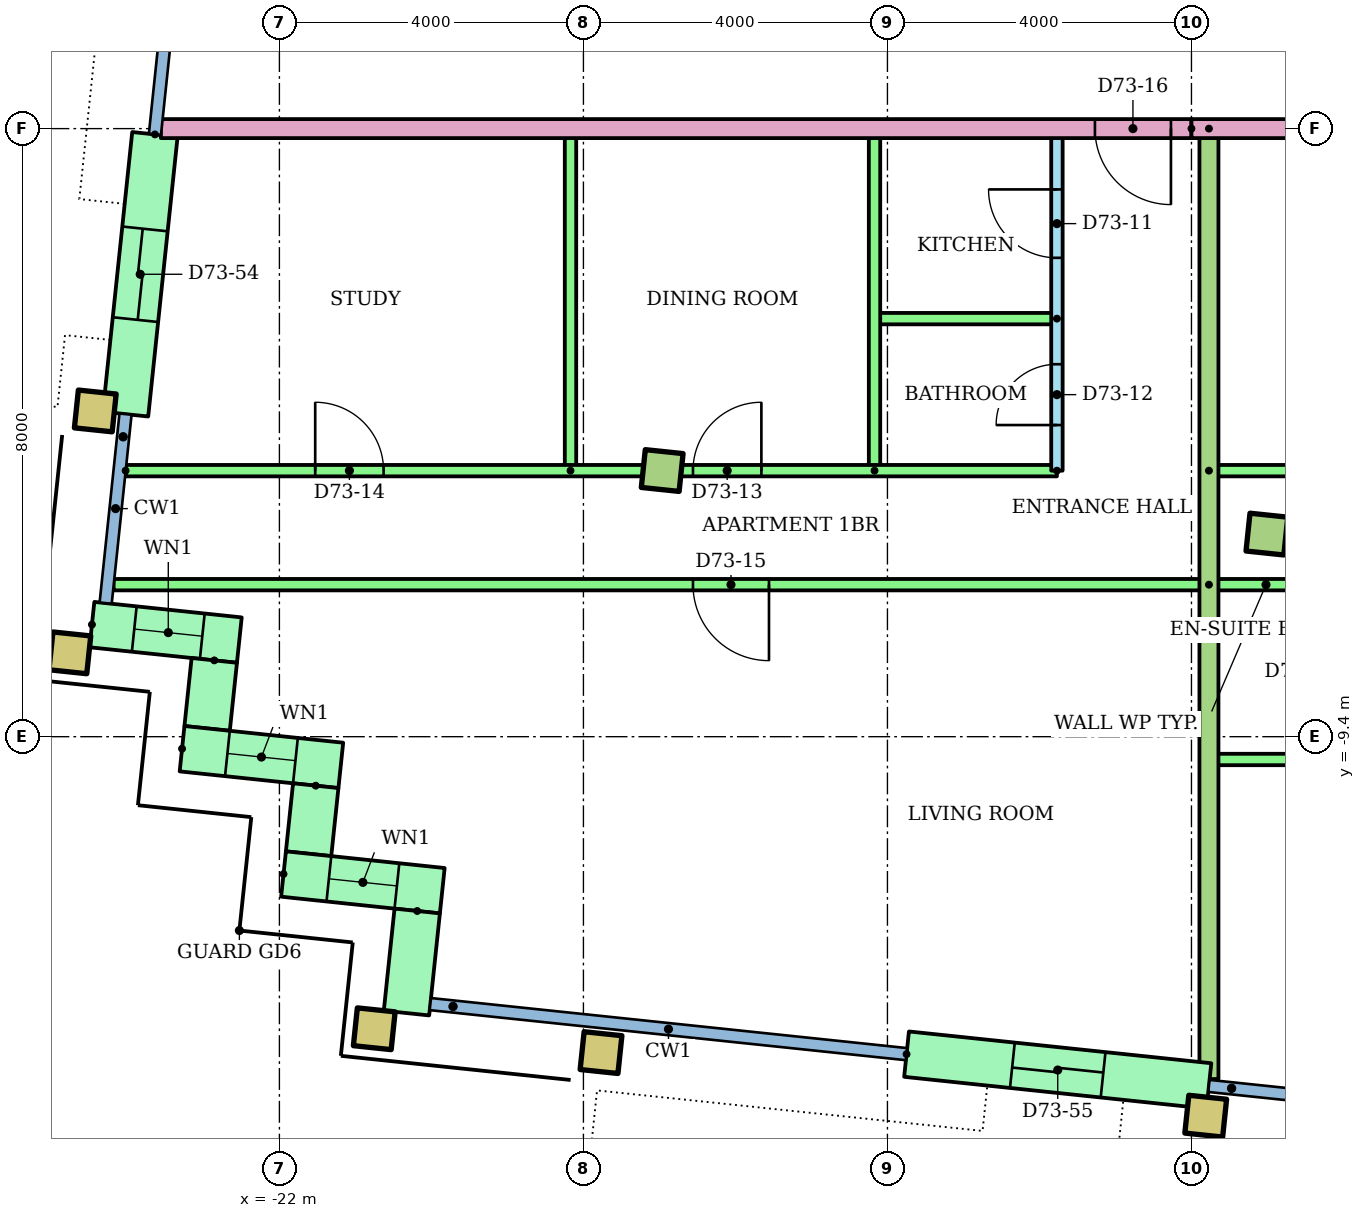
"""IFC4 building model, lengths in metres.
Left out: names, types, materials, properties, quantities, classifications, styles, units other than length and angle.
Written with IfcOpenShell. Run it as: python <this file> out.ifc"""

import sys

from ifc_helpers import new_model, si_unit, direction, frame, frame_2d, origin, origin_2d, place, context, subcontext, project, spatial, rectangle, hollow_rectangle, extrude, element, fill, save


model = new_model("IFC4")
c1 = context("Model", 3, precision=1e-05, world=origin(), true_north=direction((0.0, 1.0)))
c2 = subcontext(c1, "Body", "Model", "MODEL_VIEW")
j1 = project(units=[si_unit("LENGTHUNIT", "METRE"), si_unit("PLANEANGLEUNIT", "RADIAN")], contexts=[c1])
p1 = place(None, origin())
s1 = spatial("IfcSite", under=j1, at=p1, CompositionType="ELEMENT")
p2 = place(p1, origin())
s2 = spatial("IfcBuilding", under=s1, at=p2, CompositionType="ELEMENT")
p3 = place(p2, frame((0.0, 0.0, 278.7)))
s3 = spatial("IfcBuildingStorey", under=s2, at=p3, CompositionType="ELEMENT", Elevation=278.7)
for number, where, z_axis, x_axis in (
    (1, (-20.752, -13.243, 0.0), (0.0, 0.0, 1.0), (0.995, -0.105, 0.0)),
    (2, (-17.768, -13.556, 0.0), (0.0, 0.0, 1.0), (0.995, -0.105, 0.0)),
    (3, (-9.812, -14.392, 0.0), (0.0, 0.0, 1.0), (0.995, -0.105, 0.0)),
    (4, (-24.757, -8.297, 0.0), (0.0, 0.0, 1.0), (0.995, -0.105, 0.0)),
    (5, (-24.423, -5.115, 0.0), (0.0, 0.0, 1.0), (0.995, -0.105, 0.0)),
):
    element("IfcColumn", number, at=place(p3, frame(where, z_axis=z_axis, x_axis=x_axis)), inside=s3, PredefinedType="COLUMN", context=c2, shape_type="SweptSolid", body=[
        extrude(hollow_rectangle(XDim=0.5, YDim=0.5, WallThickness=0.025, at=origin_2d()), origin(), (0.0, 0.0, 1.0), 3.2),
    ])
for number, where, z_axis, x_axis in (
    (6, (-16.964, -5.898, 0.0), (0.0, 0.0, 1.0), (0.995, -0.105, 0.0)),
    (7, (-9.007, -6.735, 0.0), (0.0, 0.0, 1.0), (0.995, -0.105, 0.0)),
):
    element("IfcColumn", number, at=place(p3, frame(where, z_axis=z_axis, x_axis=x_axis)), inside=s3, PredefinedType="COLUMN", context=c2, shape_type="SweptSolid", body=[
        extrude(rectangle(XDim=0.5, YDim=0.5, at=origin_2d()), origin(), (0.0, 0.0, 1.0), 3.2),
    ])
p4 = place(p3, frame((-23.638, -1.476, 0.0), z_axis=(0.0, 0.0, 1.0), x_axis=(-0.104513052986, -0.994523514933, 0.0)))
e8 = element("IfcWall", 8, at=p4, inside=s3, PredefinedType="STANDARD", context=c2, shape_type="SweptSolid", body=[
    extrude(rectangle(XDim=3.7, YDim=0.6, at=frame_2d((1.85, 0.0))), origin(), (0.0, 0.0, 1.0), 2.8),
])
p5 = place(p4, frame((1.25, 0.0, 0.0)))
e9 = element("IfcOpeningElement", 9, at=p5, cuts=e8, PredefinedType="OPENING", context=c2, shape_type="SweptSolid", body=[
    extrude(rectangle(XDim=1.2, YDim=2.1, at=frame_2d((0.6, 1.05))), frame((0.0, 0.31, 0.0), z_axis=(0.0, -1.0, 0.0), x_axis=(1.0, 0.0, 0.0)), (0.0, 0.0, 1.0), 0.62),
])
p6 = place(p3, frame((-24.467, -7.925, 0.0), z_axis=(0.0, 0.0, 1.0), x_axis=(0.994521219184, -0.104534896528, 0.0)))
e10 = element("IfcWall", 10, at=p6, inside=s3, PredefinedType="STANDARD", context=c2, shape_type="SweptSolid", body=[
    extrude(rectangle(XDim=1.95, YDim=0.6, at=frame_2d((0.975, 0.0))), origin(), (0.0, 0.0, 1.0), 2.8),
])
p7 = place(p6, frame((0.56, 0.0, 0.9)))
e11 = element("IfcOpeningElement", 11, at=p7, cuts=e10, PredefinedType="OPENING", context=c2, shape_type="SweptSolid", body=[
    extrude(rectangle(XDim=0.9, YDim=1.5, at=frame_2d((0.45, 0.75))), frame((0.0, 0.31, 0.0), z_axis=(0.0, -1.0, 0.0), x_axis=(1.0, 0.0, 0.0)), (0.0, 0.0, 1.0), 0.62),
])
p8 = place(p3, frame((-22.857, -8.396, 0.0), z_axis=(0.0, 0.0, 1.0), x_axis=(-0.104444712852, -0.994530694326, 0.0)))
e12 = element("IfcWall", 12, at=p8, inside=s3, PredefinedType="STANDARD", context=c2, shape_type="SweptSolid", body=[
    extrude(rectangle(XDim=0.9, YDim=0.6, at=frame_2d((0.45, 0.0))), origin(), (0.0, 0.0, 1.0), 2.8),
])
p9 = place(p3, frame((-23.281, -9.558, 0.0), z_axis=(0.0, 0.0, 1.0), x_axis=(0.994523910136, -0.104509292252, 0.0)))
e13 = element("IfcWall", 13, at=p9, inside=s3, PredefinedType="STANDARD", context=c2, shape_type="SweptSolid", body=[
    extrude(rectangle(XDim=2.1, YDim=0.6, at=frame_2d((1.05, 0.0))), origin(), (0.0, 0.0, 1.0), 2.8),
])
p10 = place(p9, frame((0.6, 0.0, 0.9)))
e14 = element("IfcOpeningElement", 14, at=p10, cuts=e13, PredefinedType="OPENING", context=c2, shape_type="SweptSolid", body=[
    extrude(rectangle(XDim=0.9, YDim=1.5, at=frame_2d((0.45, 0.75))), frame((0.0, 0.31, 0.0), z_axis=(0.0, -1.0, 0.0), x_axis=(1.0, 0.0, 0.0)), (0.0, 0.0, 1.0), 0.62),
])
p11 = place(p3, frame((-21.522, -10.044, 0.0), z_axis=(0.0, 0.0, 1.0), x_axis=(-0.104416541099, -0.994533652495, 0.0)))
e15 = element("IfcWall", 15, at=p11, inside=s3, PredefinedType="STANDARD", context=c2, shape_type="SweptSolid", body=[
    extrude(rectangle(XDim=0.9, YDim=0.6, at=frame_2d((0.45, 0.0))), origin(), (0.0, 0.0, 1.0), 2.8),
])
p12 = place(p3, frame((-21.946, -11.207, 0.0), z_axis=(0.0, 0.0, 1.0), x_axis=(0.994511820899, -0.104624271047, 0.0)))
e16 = element("IfcWall", 16, at=p12, inside=s3, PredefinedType="STANDARD", context=c2, shape_type="SweptSolid", body=[
    extrude(rectangle(XDim=2.1, YDim=0.6, at=frame_2d((1.05, 0.0))), origin(), (0.0, 0.0, 1.0), 2.8),
])
p13 = place(p12, frame((0.6, 0.0, 0.9)))
e17 = element("IfcOpeningElement", 17, at=p13, cuts=e16, PredefinedType="OPENING", context=c2, shape_type="SweptSolid", body=[
    extrude(rectangle(XDim=0.9, YDim=1.5, at=frame_2d((0.45, 0.75))), frame((0.0, 0.31, 0.0), z_axis=(0.0, -1.0, 0.0), x_axis=(1.0, 0.0, 0.0)), (0.0, 0.0, 1.0), 0.62),
])
p14 = place(p3, frame((-20.187, -11.693, 0.0), z_axis=(0.0, 0.0, 1.0), x_axis=(-0.1043365026, -0.994542052517, 0.0)))
e18 = element("IfcWall", 18, at=p14, inside=s3, PredefinedType="STANDARD", context=c2, shape_type="SweptSolid", body=[
    extrude(rectangle(XDim=1.35, YDim=0.6, at=frame_2d((0.675, 0.0))), origin(), (0.0, 0.0, 1.0), 2.8),
])
p15 = place(p3, frame((-13.749, -13.576, 0.0), z_axis=(0.0, 0.0, 1.0), x_axis=(0.994519156568, -0.104554517933, 0.0)))
e19 = element("IfcWall", 19, at=p15, inside=s3, PredefinedType="STANDARD", context=c2, shape_type="SweptSolid", body=[
    extrude(rectangle(XDim=4.0, YDim=0.6, at=frame_2d((2.0, 0.0))), origin(), (0.0, 0.0, 1.0), 2.8),
])
p16 = place(p15, frame((1.4, 0.0, 0.0)))
e20 = element("IfcOpeningElement", 20, at=p16, cuts=e19, PredefinedType="OPENING", context=c2, shape_type="SweptSolid", body=[
    extrude(rectangle(XDim=1.2, YDim=2.1, at=frame_2d((0.6, 1.05))), frame((0.0, 0.31, 0.0), z_axis=(0.0, -1.0, 0.0), x_axis=(1.0, 0.0, 0.0)), (0.0, 0.0, 1.0), 0.62),
])
p17 = place(p3, frame((-11.77, -5.9, 0.0), z_axis=(0.0, 0.0, 1.0), x_axis=(0.0, 1.0, 0.0)))
e21 = element("IfcWall", 21, at=p17, inside=s3, PredefinedType="PARTITIONING", context=c2, shape_type="SweptSolid", body=[
    extrude(rectangle(XDim=4.5, YDim=0.15, at=frame_2d((2.25, 0.0))), origin(), (0.0, 0.0, 1.0), 2.4),
])
p18 = place(p17, frame((2.8, 0.0, 0.0)))
e22 = element("IfcOpeningElement", 22, at=p18, cuts=e21, PredefinedType="OPENING", context=c2, shape_type="SweptSolid", body=[
    extrude(rectangle(XDim=0.9, YDim=2.1, at=frame_2d((0.45, 1.05))), frame((0.0, 0.085, 0.0), z_axis=(0.0, -1.0, 0.0), x_axis=(1.0, 0.0, 0.0)), (0.0, 0.0, 1.0), 0.17),
])
p19 = place(p17, frame((0.6, 0.0, 0.0)))
e23 = element("IfcOpeningElement", 23, at=p19, cuts=e21, PredefinedType="OPENING", context=c2, shape_type="SweptSolid", body=[
    extrude(rectangle(XDim=0.8, YDim=2.1, at=frame_2d((0.4, 1.05))), frame((0.0, 0.085, 0.0), z_axis=(0.0, -1.0, 0.0), x_axis=(1.0, 0.0, 0.0)), (0.0, 0.0, 1.0), 0.17),
])
p20 = place(p3, frame((-11.77, -3.9, 0.0), z_axis=(0.0, 0.0, 1.0), x_axis=(-1.0, 0.0, 0.0)))
e24 = element("IfcWall", 24, at=p20, inside=s3, PredefinedType="PARTITIONING", context=c2, shape_type="SweptSolid", body=[
    extrude(rectangle(XDim=2.4, YDim=0.15, at=frame_2d((1.2, 0.0))), origin(), (0.0, 0.0, 1.0), 2.4),
])
for number, where, z_axis, x_axis in (
    (25, (-14.17, -5.9, 0.0), (0.0, 0.0, 1.0), (0.0, 1.0, 0.0)),
    (26, (-18.17, -5.9, 0.0), (0.0, 0.0, 1.0), (0.0, 1.0, 0.0)),
):
    element("IfcWall", number, at=place(p3, frame(where, z_axis=z_axis, x_axis=x_axis)), inside=s3, PredefinedType="PARTITIONING", context=c2, shape_type="SweptSolid", body=[
        extrude(rectangle(XDim=4.5, YDim=0.15, at=frame_2d((2.25, 0.0))), origin(), (0.0, 0.0, 1.0), 2.4),
    ])
p21 = place(p3, frame((-24.023, -5.9, 0.0)))
e27 = element("IfcWall", 27, at=p21, inside=s3, PredefinedType="PARTITIONING", context=c2, shape_type="SweptSolid", body=[
    extrude(rectangle(XDim=12.253, YDim=0.15, at=frame_2d((6.127, 0.0))), origin(), (0.0, 0.0, 1.0), 2.4),
])
p22 = place(p21, frame((7.465, 0.0, 0.0)))
e28 = element("IfcOpeningElement", 28, at=p22, cuts=e27, PredefinedType="OPENING", context=c2, shape_type="SweptSolid", body=[
    extrude(rectangle(XDim=0.9, YDim=2.1, at=frame_2d((0.45, 1.05))), frame((0.0, 0.085, 0.0), z_axis=(0.0, -1.0, 0.0), x_axis=(1.0, 0.0, 0.0)), (0.0, 0.0, 1.0), 0.17),
])
p23 = place(p21, frame((2.494, 0.0, 0.0)))
e29 = element("IfcOpeningElement", 29, at=p23, cuts=e27, PredefinedType="OPENING", context=c2, shape_type="SweptSolid", body=[
    extrude(rectangle(XDim=0.9, YDim=2.1, at=frame_2d((0.45, 1.05))), frame((0.0, 0.085, 0.0), z_axis=(0.0, -1.0, 0.0), x_axis=(1.0, 0.0, 0.0)), (0.0, 0.0, 1.0), 0.17),
])
p24 = place(p3, frame((-9.77, -7.4, 0.0), z_axis=(0.0, 0.0, 1.0), x_axis=(-1.0, 0.0, 0.0)))
e30 = element("IfcWall", 30, at=p24, inside=s3, PredefinedType="PARTITIONING", context=c2, shape_type="SweptSolid", body=[
    extrude(rectangle(XDim=14.411, YDim=0.15, at=frame_2d((7.206, 0.0))), origin(), (0.0, 0.0, 1.0), 2.4),
])
p25 = place(p24, frame((5.789, 0.0, 0.0)))
e31 = element("IfcOpeningElement", 31, at=p25, cuts=e30, PredefinedType="OPENING", context=c2, shape_type="SweptSolid", body=[
    extrude(rectangle(XDim=1.0, YDim=2.1, at=frame_2d((0.5, 1.05))), frame((0.0, 0.085, 0.0), z_axis=(0.0, -1.0, 0.0), x_axis=(1.0, 0.0, 0.0)), (0.0, 0.0, 1.0), 0.17),
])
p26 = place(p3, frame((-9.77, -5.9, 0.0)))
e32 = element("IfcWall", 32, at=p26, inside=s3, PredefinedType="PARTITIONING", context=c2, shape_type="SweptSolid", body=[
    extrude(rectangle(XDim=13.912, YDim=0.15, at=frame_2d((6.956, 0.0))), origin(), (0.0, 0.0, 1.0), 2.4),
])
p27 = place(p26, frame((9.562, 0.0, 0.0)))
e33 = element("IfcOpeningElement", 33, at=p27, cuts=e32, PredefinedType="OPENING", context=c2, shape_type="SweptSolid", body=[
    extrude(rectangle(XDim=0.9, YDim=2.1, at=frame_2d((0.45, 1.05))), frame((0.0, 0.085, 0.0), z_axis=(0.0, -1.0, 0.0), x_axis=(1.0, 0.0, 0.0)), (0.0, 0.0, 1.0), 0.17),
])
p28 = place(p26, frame((6.187, 0.0, 0.0)))
e34 = element("IfcOpeningElement", 34, at=p28, cuts=e32, PredefinedType="OPENING", context=c2, shape_type="SweptSolid", body=[
    extrude(rectangle(XDim=0.9, YDim=2.1, at=frame_2d((0.45, 1.05))), frame((0.0, 0.085, 0.0), z_axis=(0.0, -1.0, 0.0), x_axis=(1.0, 0.0, 0.0)), (0.0, 0.0, 1.0), 0.17),
])
p29 = place(p26, frame((1.931, 0.0, 0.0)))
e35 = element("IfcOpeningElement", 35, at=p29, cuts=e32, PredefinedType="OPENING", context=c2, shape_type="SweptSolid", body=[
    extrude(rectangle(XDim=0.9, YDim=2.1, at=frame_2d((0.45, 1.05))), frame((0.0, 0.085, 0.0), z_axis=(0.0, -1.0, 0.0), x_axis=(1.0, 0.0, 0.0)), (0.0, 0.0, 1.0), 0.17),
])
p30 = place(p3, frame((6.142, -7.4, 0.0), z_axis=(0.0, 0.0, 1.0), x_axis=(-1.0, 0.0, 0.0)))
e36 = element("IfcWall", 36, at=p30, inside=s3, PredefinedType="PARTITIONING", context=c2, shape_type="SweptSolid", body=[
    extrude(rectangle(XDim=15.912, YDim=0.15, at=frame_2d((7.956, 0.0))), origin(), (0.0, 0.0, 1.0), 2.4),
])
p31 = place(p30, frame((12.252, 0.0, 0.0)))
e37 = element("IfcOpeningElement", 37, at=p31, cuts=e36, PredefinedType="OPENING", context=c2, shape_type="SweptSolid", body=[
    extrude(rectangle(XDim=0.9, YDim=2.1, at=frame_2d((0.45, 1.05))), frame((0.0, 0.085, 0.0), z_axis=(0.0, -1.0, 0.0), x_axis=(1.0, 0.0, 0.0)), (0.0, 0.0, 1.0), 0.17),
])
p32 = place(p30, frame((9.495, 0.0, 0.0)))
e38 = element("IfcOpeningElement", 38, at=p32, cuts=e36, PredefinedType="OPENING", context=c2, shape_type="SweptSolid", body=[
    extrude(rectangle(XDim=0.9, YDim=2.1, at=frame_2d((0.45, 1.05))), frame((0.0, 0.085, 0.0), z_axis=(0.0, -1.0, 0.0), x_axis=(1.0, 0.0, 0.0)), (0.0, 0.0, 1.0), 0.17),
])
p33 = place(p30, frame((3.478, 0.0, 0.0)))
e39 = element("IfcOpeningElement", 39, at=p33, cuts=e36, PredefinedType="OPENING", context=c2, shape_type="SweptSolid", body=[
    extrude(rectangle(XDim=1.0, YDim=2.1, at=frame_2d((0.5, 1.05))), frame((0.0, 0.085, 0.0), z_axis=(0.0, -1.0, 0.0), x_axis=(1.0, 0.0, 0.0)), (0.0, 0.0, 1.0), 0.17),
])
p34 = place(p3, frame((-7.77, -9.7, 0.0), z_axis=(0.0, 0.0, 1.0), x_axis=(-1.0, 0.0, 0.0)))
e40 = element("IfcWall", 40, at=p34, inside=s3, PredefinedType="PARTITIONING", context=c2, shape_type="SweptSolid", body=[
    extrude(rectangle(XDim=2.0, YDim=0.15, at=frame_2d((1.0, 0.0))), origin(), (0.0, 0.0, 1.0), 2.4),
])
p35 = place(p3, frame((-9.77, -1.4, 0.0), z_axis=(0.0, 0.0, 1.0), x_axis=(0.0, -1.0, 0.0)))
e41 = element("IfcWall", 41, at=p35, inside=s3, PredefinedType="PARTITIONING", context=c2, shape_type="SweptSolid", body=[
    extrude(rectangle(XDim=12.504, YDim=0.25, at=frame_2d((6.252, 0.0))), origin(), (0.0, 0.0, 1.0), 2.4),
])
p36 = place(p3, frame((-10.0, -1.4, 0.0), z_axis=(0.0, 0.0, 1.0), x_axis=(-1.0, 0.0, 0.0)))
e42 = element("IfcWall", 42, at=p36, inside=s3, PredefinedType="PARTITIONING", context=c2, shape_type="SweptSolid", body=[
    extrude(rectangle(XDim=13.56, YDim=0.25, at=frame_2d((6.78, 0.0))), origin(), (0.0, 0.0, 1.0), 2.4),
])
p37 = place(p36, frame((0.27, 0.0, 0.0)))
e43 = element("IfcOpeningElement", 43, at=p37, cuts=e42, PredefinedType="OPENING", context=c2, shape_type="SweptSolid", body=[
    extrude(rectangle(XDim=1.0, YDim=2.1, at=frame_2d((0.5, 1.05))), frame((0.0, 0.135, 0.0), z_axis=(0.0, -1.0, 0.0), x_axis=(1.0, 0.0, 0.0)), (0.0, 0.0, 1.0), 0.27),
])
p38 = place(p3, frame((10.0, -1.4, 0.0), z_axis=(0.0, 0.0, 1.0), x_axis=(-1.0, 0.0, 0.0)))
e44 = element("IfcWall", 44, at=p38, inside=s3, PredefinedType="PARTITIONING", context=c2, shape_type="SweptSolid", body=[
    extrude(rectangle(XDim=20.0, YDim=0.25, at=frame_2d((10.0, 0.0))), origin(), (0.0, 0.0, 1.0), 2.4),
])
p39 = place(p38, frame((4.358, 0.0, 0.0)))
e45 = element("IfcOpeningElement", 45, at=p39, cuts=e44, PredefinedType="OPENING", context=c2, shape_type="SweptSolid", body=[
    extrude(rectangle(XDim=1.0, YDim=2.1, at=frame_2d((0.5, 1.05))), frame((0.0, 0.135, 0.0), z_axis=(0.0, -1.0, 0.0), x_axis=(1.0, 0.0, 0.0)), (0.0, 0.0, 1.0), 0.27),
])
p40 = place(p38, frame((2.614, 0.0, 0.0)))
e46 = element("IfcOpeningElement", 46, at=p40, cuts=e44, PredefinedType="OPENING", context=c2, shape_type="SweptSolid", body=[
    extrude(rectangle(XDim=0.9, YDim=2.1, at=frame_2d((0.45, 1.05))), frame((0.0, 0.135, 0.0), z_axis=(0.0, -1.0, 0.0), x_axis=(1.0, 0.0, 0.0)), (0.0, 0.0, 1.0), 0.27),
])
p41 = place(p7, origin())
e47 = element("IfcWindow", 47, at=p41, inside=s3, PartitioningType="SINGLE_PANEL", PredefinedType="WINDOW", context=c2, shape_type="SweptSolid", body=[
    extrude(rectangle(XDim=0.9, YDim=1.5, at=frame_2d((0.45, 0.75))), frame((0.0, 0.03, 0.0), z_axis=(0.0, -1.0, 0.0), x_axis=(1.0, 0.0, 0.0)), (0.0, 0.0, 1.0), 0.06),
])
fill(e11, e47)
p42 = place(p10, origin())
e48 = element("IfcWindow", 48, at=p42, inside=s3, PartitioningType="SINGLE_PANEL", PredefinedType="WINDOW", context=c2, shape_type="SweptSolid", body=[
    extrude(rectangle(XDim=0.9, YDim=1.5, at=frame_2d((0.45, 0.75))), frame((0.0, 0.03, 0.0), z_axis=(0.0, -1.0, 0.0), x_axis=(1.0, 0.0, 0.0)), (0.0, 0.0, 1.0), 0.06),
])
fill(e14, e48)
p43 = place(p13, origin())
e49 = element("IfcWindow", 49, at=p43, inside=s3, PartitioningType="SINGLE_PANEL", PredefinedType="WINDOW", context=c2, shape_type="SweptSolid", body=[
    extrude(rectangle(XDim=0.9, YDim=1.5, at=frame_2d((0.45, 0.75))), frame((0.0, 0.03, 0.0), z_axis=(0.0, -1.0, 0.0), x_axis=(1.0, 0.0, 0.0)), (0.0, 0.0, 1.0), 0.06),
])
fill(e17, e49)
p44 = place(p18, origin())
e50 = element("IfcDoor", 50, at=p44, inside=s3, OperationType="SINGLE_SWING_RIGHT", PredefinedType="DOOR", context=c2, shape_type="SweptSolid", body=[
    extrude(rectangle(XDim=0.9, YDim=2.1, at=frame_2d((0.45, 1.05))), frame((0.0, 0.025, 0.0), z_axis=(0.0, -1.0, 0.0), x_axis=(1.0, 0.0, 0.0)), (0.0, 0.0, 1.0), 0.05),
])
fill(e22, e50)
p45 = place(p19, origin())
e51 = element("IfcDoor", 51, at=p45, inside=s3, OperationType="SINGLE_SWING_LEFT", PredefinedType="DOOR", context=c2, shape_type="SweptSolid", body=[
    extrude(rectangle(XDim=0.8, YDim=2.1, at=frame_2d((0.4, 1.05))), frame((0.0, 0.025, 0.0), z_axis=(0.0, -1.0, 0.0), x_axis=(1.0, 0.0, 0.0)), (0.0, 0.0, 1.0), 0.05),
])
fill(e23, e51)
p46 = place(p22, origin())
e52 = element("IfcDoor", 52, at=p46, inside=s3, OperationType="SINGLE_SWING_RIGHT", PredefinedType="DOOR", context=c2, shape_type="SweptSolid", body=[
    extrude(rectangle(XDim=0.9, YDim=2.1, at=frame_2d((0.45, 1.05))), frame((0.0, 0.025, 0.0), z_axis=(0.0, -1.0, 0.0), x_axis=(1.0, 0.0, 0.0)), (0.0, 0.0, 1.0), 0.05),
])
fill(e28, e52)
p47 = place(p23, origin())
e53 = element("IfcDoor", 53, at=p47, inside=s3, OperationType="SINGLE_SWING_LEFT", PredefinedType="DOOR", context=c2, shape_type="SweptSolid", body=[
    extrude(rectangle(XDim=0.9, YDim=2.1, at=frame_2d((0.45, 1.05))), frame((0.0, 0.025, 0.0), z_axis=(0.0, -1.0, 0.0), x_axis=(1.0, 0.0, 0.0)), (0.0, 0.0, 1.0), 0.05),
])
fill(e29, e53)
p48 = place(p25, origin())
e54 = element("IfcDoor", 54, at=p48, inside=s3, OperationType="SINGLE_SWING_LEFT", PredefinedType="DOOR", context=c2, shape_type="SweptSolid", body=[
    extrude(rectangle(XDim=1.0, YDim=2.1, at=frame_2d((0.5, 1.05))), frame((0.0, 0.025, 0.0), z_axis=(0.0, -1.0, 0.0), x_axis=(1.0, 0.0, 0.0)), (0.0, 0.0, 1.0), 0.05),
])
fill(e31, e54)
p49 = place(p37, origin())
e55 = element("IfcDoor", 55, at=p49, inside=s3, OperationType="SINGLE_SWING_LEFT", PredefinedType="DOOR", context=c2, shape_type="SweptSolid", body=[
    extrude(rectangle(XDim=1.0, YDim=2.1, at=frame_2d((0.5, 1.05))), frame((0.0, 0.025, 0.0), z_axis=(0.0, -1.0, 0.0), x_axis=(1.0, 0.0, 0.0)), (0.0, 0.0, 1.0), 0.05),
])
fill(e43, e55)
p50 = place(p5, origin())
e56 = element("IfcDoor", 56, at=p50, inside=s3, OperationType="SLIDING_TO_LEFT", PredefinedType="DOOR", context=c2, shape_type="SweptSolid", body=[
    extrude(rectangle(XDim=1.2, YDim=2.1, at=frame_2d((0.6, 1.05))), frame((0.0, 0.025, 0.0), z_axis=(0.0, -1.0, 0.0), x_axis=(1.0, 0.0, 0.0)), (0.0, 0.0, 1.0), 0.05),
])
fill(e9, e56)
p51 = place(p16, origin())
e57 = element("IfcDoor", 57, at=p51, inside=s3, OperationType="SLIDING_TO_LEFT", PredefinedType="DOOR", context=c2, shape_type="SweptSolid", body=[
    extrude(rectangle(XDim=1.2, YDim=2.1, at=frame_2d((0.6, 1.05))), frame((0.0, 0.025, 0.0), z_axis=(0.0, -1.0, 0.0), x_axis=(1.0, 0.0, 0.0)), (0.0, 0.0, 1.0), 0.05),
])
fill(e20, e57)
save(model, sys.argv[1])
